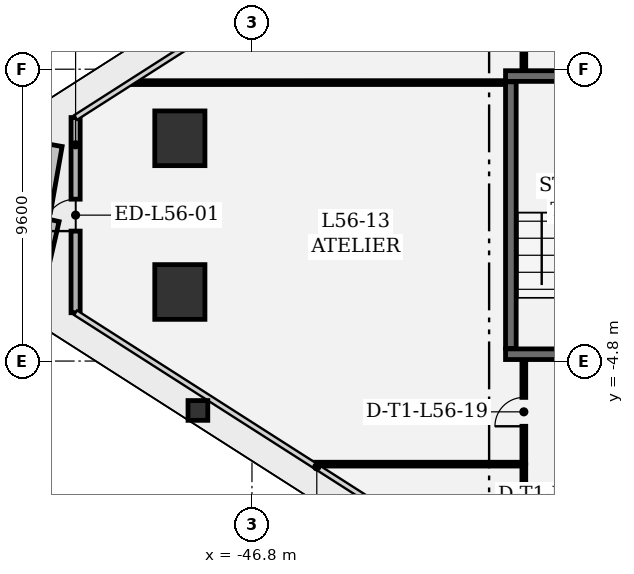
"""IFC4 building model, lengths in metres.
Left out: names, types, materials, properties, quantities, classifications, styles, units other than length and angle.
Written with IfcOpenShell. Run it as: python <this file> out.ifc"""

import sys

from ifc_helpers import new_model, si_unit, direction, frame, frame_2d, origin, origin_2d, place, context, subcontext, project, spatial, rectangle, extrude, element, fill, save


model = new_model("IFC4")
c1 = context("Model", 3, precision=1e-05, world=origin(), true_north=direction((0.0, 1.0)))
c2 = subcontext(c1, "Body", "Model", "MODEL_VIEW")
j1 = project(units=[si_unit("LENGTHUNIT", "METRE"), si_unit("PLANEANGLEUNIT", "RADIAN")], contexts=[c1])
p1 = place(None, origin())
s1 = spatial("IfcSite", under=j1, at=p1, CompositionType="ELEMENT")
p2 = place(p1, origin())
s2 = spatial("IfcBuilding", under=s1, at=p2, CompositionType="ELEMENT")
p3 = place(p2, frame((0.0, 0.0, 241.5)))
s3 = spatial("IfcBuildingStorey", under=s2, at=p3, CompositionType="ELEMENT", Elevation=241.5)
for number, where, z_axis, x_axis in (
    (1, (-49.172, 2.528, 0.0), (0.0, 0.0, 1.0), (1.0, 0.0, 0.0)),
    (2, (-49.172, -2.528, 0.0), (0.0, 0.0, 1.0), (1.0, 0.0, 0.0)),
):
    element("IfcColumn", number, at=place(p3, frame(where, z_axis=z_axis, x_axis=x_axis)), inside=s3, PredefinedType="COLUMN", context=c2, shape_type="SweptSolid", body=[
        extrude(rectangle(XDim=1.65, YDim=1.8, at=origin_2d()), origin(), (0.0, 0.0, 1.0), 4.05),
    ])
p4 = place(p3, frame((-48.578, -6.425, 0.0), z_axis=(0.0, 0.0, 1.0), x_axis=(1.0, 0.0, 0.0)))
e3 = element("IfcColumn", 3, at=p4, inside=s3, PredefinedType="COLUMN", context=c2, shape_type="SweptSolid", body=[
    extrude(rectangle(XDim=0.65, YDim=0.65, at=origin_2d()), origin(), (0.0, 0.0, 1.0), 4.05),
])
p5 = place(p3, frame((-52.601, -3.21, 0.0), z_axis=(0.0, 0.0, 1.0), x_axis=(0.0, 1.0, 0.0)))
e4 = element("IfcWall", 4, at=p5, inside=s3, PredefinedType="SOLIDWALL", context=c2, shape_type="SweptSolid", body=[
    extrude(rectangle(XDim=6.421, YDim=0.3, at=frame_2d((3.21, 0.0))), origin(), (0.0, 0.0, 1.0), 3.78),
])
p6 = place(p5, frame((2.685, 0.0, 0.0)))
e5 = element("IfcOpeningElement", 5, at=p6, cuts=e4, PredefinedType="OPENING", context=c2, shape_type="SweptSolid", body=[
    extrude(rectangle(XDim=1.05, YDim=2.2, at=frame_2d((0.525, 1.1))), frame((0.0, 0.16, 0.0), z_axis=(0.0, -1.0, 0.0), x_axis=(1.0, 0.0, 0.0)), (0.0, 0.0, 1.0), 0.32),
])
p7 = place(p3, frame((-38.46, -4.575, 0.0), z_axis=(0.0, 0.0, 1.0), x_axis=(1.0, 0.0, 0.0)))
e6 = element("IfcWall", 6, at=p7, inside=s3, PredefinedType="SHEAR", context=c2, shape_type="SweptSolid", body=[
    extrude(rectangle(XDim=4.21, YDim=0.35, at=frame_2d((2.105, 0.0))), origin(), (0.0, 0.0, 1.0), 3.78),
])
p8 = place(p7, frame((2.39, 0.0, 0.0)))
e7 = element("IfcOpeningElement", 7, at=p8, cuts=e6, PredefinedType="OPENING", context=c2, shape_type="SweptSolid", body=[
    extrude(rectangle(XDim=1.1, YDim=2.2, at=frame_2d((0.55, 1.1))), frame((0.0, 0.185, 0.0), z_axis=(0.0, -1.0, 0.0), x_axis=(1.0, 0.0, 0.0)), (0.0, 0.0, 1.0), 0.37),
])
p9 = place(p3, frame((-34.25, 4.575, 0.0), z_axis=(0.0, 0.0, 1.0), x_axis=(-1.0, 0.0, 0.0)))
e8 = element("IfcWall", 8, at=p9, inside=s3, PredefinedType="SHEAR", context=c2, shape_type="SweptSolid", body=[
    extrude(rectangle(XDim=4.21, YDim=0.35, at=frame_2d((2.105, 0.0))), origin(), (0.0, 0.0, 1.0), 3.78),
])
p10 = place(p3, frame((-38.285, 4.385, 0.0), z_axis=(0.0, 0.0, 1.0), x_axis=(0.0, -1.0, 0.0)))
e9 = element("IfcWall", 9, at=p10, inside=s3, PredefinedType="SHEAR", context=c2, shape_type="SweptSolid", body=[
    extrude(rectangle(XDim=8.77, YDim=0.35, at=frame_2d((4.385, 0.0))), origin(), (0.0, 0.0, 1.0), 3.78),
])
p11 = place(p3, frame((-37.858, -10.933, 0.0), z_axis=(0.0, 0.0, 1.0), x_axis=(0.0, 1.0, 0.0)))
e10 = element("IfcWall", 10, at=p11, inside=s3, PredefinedType="PARTITIONING", context=c2, shape_type="SweptSolid", body=[
    extrude(rectangle(XDim=2.717, YDim=0.125, at=frame_2d((1.359, 0.0))), origin(), (0.0, 0.0, 1.0), 3.78),
])
p12 = place(p3, frame((-37.883, -8.191, 0.0), z_axis=(0.0, 0.0, 1.0), x_axis=(-1.0, 0.0, 0.0)))
e11 = element("IfcWall", 11, at=p12, inside=s3, PredefinedType="PARTITIONING", context=c2, shape_type="SweptSolid", body=[
    extrude(rectangle(XDim=6.846, YDim=0.125, at=frame_2d((3.423, 0.0))), origin(), (0.0, 0.0, 1.0), 3.0),
])
p13 = place(p3, frame((-37.858, -8.158, 0.0), z_axis=(0.0, 0.0, 1.0), x_axis=(0.0, 1.0, 0.0)))
e12 = element("IfcWall", 12, at=p13, inside=s3, PredefinedType="PARTITIONING", context=c2, shape_type="SweptSolid", body=[
    extrude(rectangle(XDim=3.375, YDim=0.125, at=frame_2d((1.687, 0.0))), origin(), (0.0, 0.0, 1.0), 3.78),
])
p14 = place(p13, frame((1.212, 0.0, 0.0)))
e13 = element("IfcOpeningElement", 13, at=p14, cuts=e12, PredefinedType="OPENING", context=c2, shape_type="SweptSolid", body=[
    extrude(rectangle(XDim=0.95, YDim=2.15, at=frame_2d((0.475, 1.075))), frame((0.0, 0.073, 0.0), z_axis=(0.0, -1.0, 0.0), x_axis=(1.0, 0.0, 0.0)), (0.0, 0.0, 1.0), 0.145),
])
p15 = place(p3, frame((-38.493, 4.36, 0.0), z_axis=(0.0, 0.0, 1.0), x_axis=(-0.99999999024, -0.000139712192, 0.0)))
e14 = element("IfcWall", 14, at=p15, inside=s3, PredefinedType="PARTITIONING", context=c2, shape_type="SweptSolid", body=[
    extrude(rectangle(XDim=12.232, YDim=0.125, at=frame_2d((6.116, 0.0))), origin(), (0.0, 0.0, 1.0), 3.0),
])
p16 = place(p3, frame((-37.858, 4.783, 0.0), z_axis=(0.0, 0.0, 1.0), x_axis=(0.0, 1.0, 0.0)))
e15 = element("IfcWall", 15, at=p16, inside=s3, PredefinedType="PARTITIONING", context=c2, shape_type="SweptSolid", body=[
    extrude(rectangle(XDim=4.456, YDim=0.125, at=frame_2d((2.228, 0.0))), origin(), (0.0, 0.0, 1.0), 3.78),
])
p17 = place(p16, frame((1.753, 0.0, 0.0)))
e16 = element("IfcOpeningElement", 16, at=p17, cuts=e15, PredefinedType="OPENING", context=c2, shape_type="SweptSolid", body=[
    extrude(rectangle(XDim=0.95, YDim=2.15, at=frame_2d((0.475, 1.075))), frame((0.0, 0.073, 0.0), z_axis=(0.0, -1.0, 0.0), x_axis=(1.0, 0.0, 0.0)), (0.0, 0.0, 1.0), 0.145),
])
p18 = place(p6, origin())
e17 = element("IfcDoor", 17, at=p18, inside=s3, OperationType="SINGLE_SWING_LEFT", PredefinedType="DOOR", context=c2, shape_type="SweptSolid", body=[
    extrude(rectangle(XDim=1.05, YDim=2.2, at=frame_2d((0.525, 1.1))), frame((0.0, 0.025, 0.0), z_axis=(0.0, -1.0, 0.0), x_axis=(1.0, 0.0, 0.0)), (0.0, 0.0, 1.0), 0.05),
])
fill(e5, e17)
p19 = place(p14, origin())
e18 = element("IfcDoor", 18, at=p19, inside=s3, OperationType="SINGLE_SWING_LEFT", PredefinedType="DOOR", context=c2, shape_type="SweptSolid", body=[
    extrude(rectangle(XDim=0.95, YDim=2.15, at=frame_2d((0.475, 1.075))), frame((0.0, 0.025, 0.0), z_axis=(0.0, -1.0, 0.0), x_axis=(1.0, 0.0, 0.0)), (0.0, 0.0, 1.0), 0.05),
])
fill(e13, e18)
save(model, sys.argv[1])
